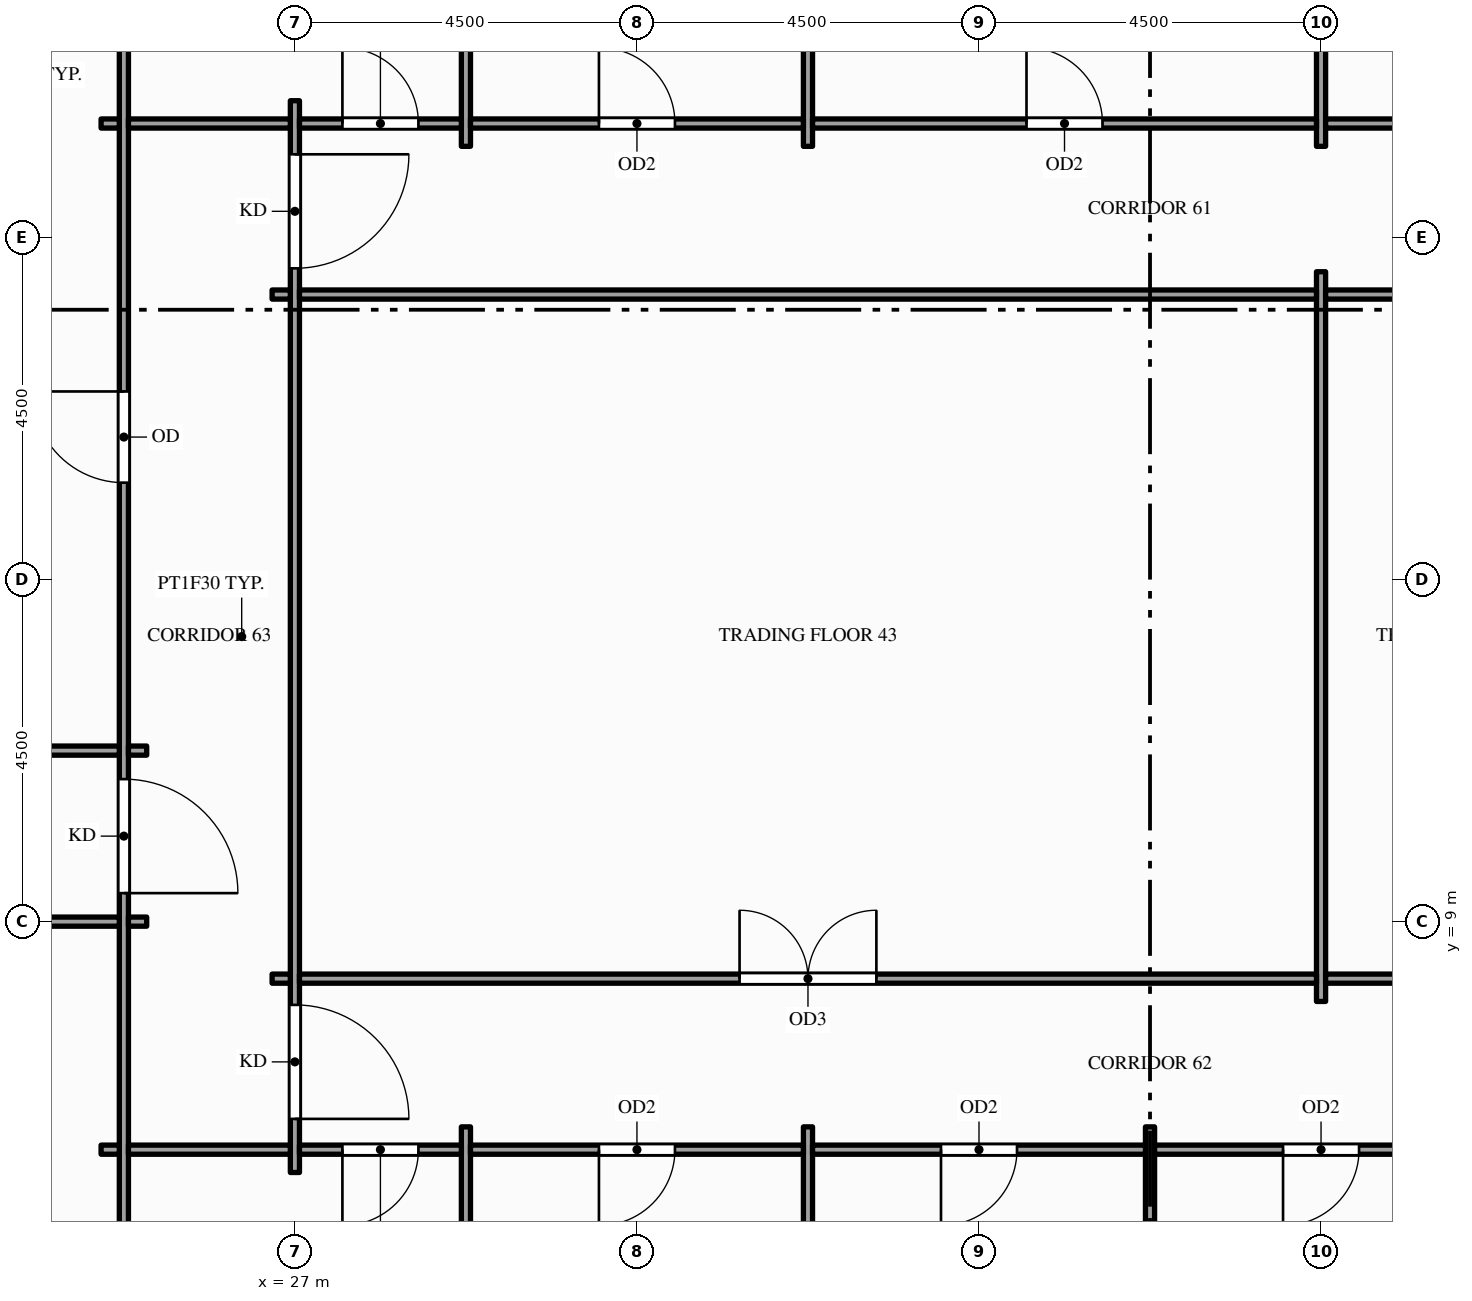
"""IFC4 building model, lengths in metres.
Left out: names, types, materials, properties, quantities, classifications, styles, units other than length and angle.
Written with IfcOpenShell. Run it as: python <this file> out.ifc"""

import sys

from ifc_helpers import new_model, si_unit, direction, frame, frame_2d, origin, place, context, subcontext, project, spatial, rectangle, extrude, element, fill, save


model = new_model("IFC4")
c1 = context("Model", 3, precision=1e-05, world=origin(), true_north=direction((0.0, 1.0)))
c2 = subcontext(c1, "Body", "Model", "MODEL_VIEW")
j1 = project(units=[si_unit("LENGTHUNIT", "METRE"), si_unit("PLANEANGLEUNIT", "RADIAN")], contexts=[c1])
p1 = place(None, origin())
s1 = spatial("IfcSite", under=j1, at=p1, CompositionType="ELEMENT")
p2 = place(p1, origin())
s2 = spatial("IfcBuilding", under=s1, at=p2, CompositionType="ELEMENT")
p3 = place(p2, frame((0.0, 0.0, 159.0)))
s3 = spatial("IfcBuildingStorey", under=s2, at=p3, CompositionType="ELEMENT", Elevation=159.0)
p4 = place(p3, frame((24.75, 1.65, 0.0), z_axis=(0.0, 0.0, 1.0), x_axis=(0.0, 1.0, 0.0)))
e1 = element("IfcWall", 1, at=p4, inside=s3, PredefinedType="PARTITIONING", context=c2, shape_type="SweptSolid", body=[
    extrude(rectangle(XDim=22.298, YDim=0.12, at=frame_2d((11.149, 0.0))), origin(), (0.0, 0.0, 1.0), 2.87),
])
p5 = place(p4, frame((7.725, 0.0, 0.0)))
e2 = element("IfcOpeningElement", 2, at=p5, cuts=e1, PredefinedType="OPENING", context=c2, shape_type="SweptSolid", body=[
    extrude(rectangle(XDim=1.5, YDim=2.1, at=frame_2d((0.75, 1.05))), frame((0.0, 0.07, 0.0), z_axis=(0.0, -1.0, 0.0), x_axis=(1.0, 0.0, 0.0)), (0.0, 0.0, 1.0), 0.14),
])
p6 = place(p4, frame((13.125, 0.0, 0.0)))
e3 = element("IfcOpeningElement", 3, at=p6, cuts=e1, PredefinedType="OPENING", context=c2, shape_type="SweptSolid", body=[
    extrude(rectangle(XDim=1.2, YDim=2.1, at=frame_2d((0.6, 1.05))), frame((0.0, 0.07, 0.0), z_axis=(0.0, -1.0, 0.0), x_axis=(1.0, 0.0, 0.0)), (0.0, 0.0, 1.0), 0.14),
])
p7 = place(p3, frame((27.0, 5.7, 0.0), z_axis=(0.0, 0.0, 1.0), x_axis=(0.0, 1.0, 0.0)))
e4 = element("IfcWall", 4, at=p7, inside=s3, PredefinedType="PARTITIONING", context=c2, shape_type="SweptSolid", body=[
    extrude(rectangle(XDim=14.1, YDim=0.12, at=frame_2d((7.05, 0.0))), origin(), (0.0, 0.0, 1.0), 2.87),
])
p8 = place(p7, frame((0.705, 0.0, 0.0)))
e5 = element("IfcOpeningElement", 5, at=p8, cuts=e4, PredefinedType="OPENING", context=c2, shape_type="SweptSolid", body=[
    extrude(rectangle(XDim=1.5, YDim=2.1, at=frame_2d((0.75, 1.05))), frame((0.0, 0.07, 0.0), z_axis=(0.0, -1.0, 0.0), x_axis=(1.0, 0.0, 0.0)), (0.0, 0.0, 1.0), 0.14),
])
p9 = place(p7, frame((11.895, 0.0, 0.0)))
e6 = element("IfcOpeningElement", 6, at=p9, cuts=e4, PredefinedType="OPENING", context=c2, shape_type="SweptSolid", body=[
    extrude(rectangle(XDim=1.5, YDim=2.1, at=frame_2d((0.75, 1.05))), frame((0.0, 0.07, 0.0), z_axis=(0.0, -1.0, 0.0), x_axis=(1.0, 0.0, 0.0)), (0.0, 0.0, 1.0), 0.14),
])
for number, where, z_axis, x_axis in (
    (7, (29.25, 1.65, 0.0), (0.0, 0.0, 1.0), (0.0, 1.0, 0.0)),
    (8, (29.25, 19.2, 0.0), (0.0, 0.0, 1.0), (0.0, 1.0, 0.0)),
    (9, (33.75, 1.65, 0.0), (0.0, 0.0, 1.0), (0.0, 1.0, 0.0)),
    (10, (33.75, 19.2, 0.0), (0.0, 0.0, 1.0), (0.0, 1.0, 0.0)),
    (11, (38.25, 1.65, 0.0), (0.0, 0.0, 1.0), (0.0, 1.0, 0.0)),
):
    element("IfcWall", number, at=place(p3, frame(where, z_axis=z_axis, x_axis=x_axis)), inside=s3, PredefinedType="PARTITIONING", context=c2, shape_type="SweptSolid", body=[
        extrude(rectangle(XDim=4.65, YDim=0.12, at=frame_2d((2.325, 0.0))), origin(), (0.0, 0.0, 1.0), 2.87),
    ])
p10 = place(p3, frame((40.5, 7.95, 0.0), z_axis=(0.0, 0.0, 1.0), x_axis=(0.0, 1.0, 0.0)))
e12 = element("IfcWall", 12, at=p10, inside=s3, PredefinedType="PARTITIONING", context=c2, shape_type="SweptSolid", body=[
    extrude(rectangle(XDim=9.6, YDim=0.12, at=frame_2d((4.8, 0.0))), origin(), (0.0, 0.0, 1.0), 2.87),
])
p11 = place(p3, frame((40.5, 19.2, 0.0), z_axis=(0.0, 0.0, 1.0), x_axis=(0.0, 1.0, 0.0)))
e13 = element("IfcWall", 13, at=p11, inside=s3, PredefinedType="PARTITIONING", context=c2, shape_type="SweptSolid", body=[
    extrude(rectangle(XDim=4.65, YDim=0.12, at=frame_2d((2.325, 0.0))), origin(), (0.0, 0.0, 1.0), 2.87),
])
p12 = place(p3, frame((24.45, 6.0, 0.0), z_axis=(0.0, 0.0, 1.0), x_axis=(1.0, 0.0, 0.0)))
e14 = element("IfcWall", 14, at=p12, inside=s3, PredefinedType="PARTITIONING", context=c2, shape_type="SweptSolid", body=[
    extrude(rectangle(XDim=0.24, YDim=0.12, at=frame_2d((0.12, 0.0))), origin(), (0.0, 0.0, 1.0), 2.87),
])
p13 = place(p3, frame((24.81, 6.0, 0.0), z_axis=(0.0, 0.0, 1.0), x_axis=(1.0, 0.0, 0.0)))
e15 = element("IfcWall", 15, at=p13, inside=s3, PredefinedType="PARTITIONING", context=c2, shape_type="SweptSolid", body=[
    extrude(rectangle(XDim=2.13, YDim=0.12, at=frame_2d((1.065, 0.0))), origin(), (0.0, 0.0, 1.0), 2.87),
])
p14 = place(p3, frame((27.06, 6.0, 0.0), z_axis=(0.0, 0.0, 1.0), x_axis=(1.0, 0.0, 0.0)))
e16 = element("IfcWall", 16, at=p14, inside=s3, PredefinedType="PARTITIONING", context=c2, shape_type="SweptSolid", body=[
    extrude(rectangle(XDim=2.13, YDim=0.12, at=frame_2d((1.065, 0.0))), origin(), (0.0, 0.0, 1.0), 2.87),
])
p15 = place(p14, frame((0.565, 0.0, 0.0)))
e17 = element("IfcOpeningElement", 17, at=p15, cuts=e16, PredefinedType="OPENING", context=c2, shape_type="SweptSolid", body=[
    extrude(rectangle(XDim=1.0, YDim=2.1, at=frame_2d((0.5, 1.05))), frame((0.0, 0.07, 0.0), z_axis=(0.0, -1.0, 0.0), x_axis=(1.0, 0.0, 0.0)), (0.0, 0.0, 1.0), 0.14),
])
p16 = place(p3, frame((29.31, 6.0, 0.0), z_axis=(0.0, 0.0, 1.0), x_axis=(1.0, 0.0, 0.0)))
e18 = element("IfcWall", 18, at=p16, inside=s3, PredefinedType="PARTITIONING", context=c2, shape_type="SweptSolid", body=[
    extrude(rectangle(XDim=4.38, YDim=0.12, at=frame_2d((2.19, 0.0))), origin(), (0.0, 0.0, 1.0), 2.87),
])
p17 = place(p16, frame((1.69, 0.0, 0.0)))
e19 = element("IfcOpeningElement", 19, at=p17, cuts=e18, PredefinedType="OPENING", context=c2, shape_type="SweptSolid", body=[
    extrude(rectangle(XDim=1.0, YDim=2.1, at=frame_2d((0.5, 1.05))), frame((0.0, 0.07, 0.0), z_axis=(0.0, -1.0, 0.0), x_axis=(1.0, 0.0, 0.0)), (0.0, 0.0, 1.0), 0.14),
])
p18 = place(p3, frame((33.81, 6.0, 0.0), z_axis=(0.0, 0.0, 1.0), x_axis=(1.0, 0.0, 0.0)))
e20 = element("IfcWall", 20, at=p18, inside=s3, PredefinedType="PARTITIONING", context=c2, shape_type="SweptSolid", body=[
    extrude(rectangle(XDim=4.38, YDim=0.12, at=frame_2d((2.19, 0.0))), origin(), (0.0, 0.0, 1.0), 2.87),
])
p19 = place(p18, frame((1.69, 0.0, 0.0)))
e21 = element("IfcOpeningElement", 21, at=p19, cuts=e20, PredefinedType="OPENING", context=c2, shape_type="SweptSolid", body=[
    extrude(rectangle(XDim=1.0, YDim=2.1, at=frame_2d((0.5, 1.05))), frame((0.0, 0.07, 0.0), z_axis=(0.0, -1.0, 0.0), x_axis=(1.0, 0.0, 0.0)), (0.0, 0.0, 1.0), 0.14),
])
p20 = place(p3, frame((38.31, 6.0, 0.0), z_axis=(0.0, 0.0, 1.0), x_axis=(1.0, 0.0, 0.0)))
e22 = element("IfcWall", 22, at=p20, inside=s3, PredefinedType="PARTITIONING", context=c2, shape_type="SweptSolid", body=[
    extrude(rectangle(XDim=4.38, YDim=0.12, at=frame_2d((2.19, 0.0))), origin(), (0.0, 0.0, 1.0), 2.87),
])
p21 = place(p20, frame((1.69, 0.0, 0.0)))
e23 = element("IfcOpeningElement", 23, at=p21, cuts=e22, PredefinedType="OPENING", context=c2, shape_type="SweptSolid", body=[
    extrude(rectangle(XDim=1.0, YDim=2.1, at=frame_2d((0.5, 1.05))), frame((0.0, 0.07, 0.0), z_axis=(0.0, -1.0, 0.0), x_axis=(1.0, 0.0, 0.0)), (0.0, 0.0, 1.0), 0.14),
])
p22 = place(p3, frame((26.7, 8.25, 0.0), z_axis=(0.0, 0.0, 1.0), x_axis=(1.0, 0.0, 0.0)))
e24 = element("IfcWall", 24, at=p22, inside=s3, PredefinedType="PARTITIONING", context=c2, shape_type="SweptSolid", body=[
    extrude(rectangle(XDim=0.24, YDim=0.12, at=frame_2d((0.12, 0.0))), origin(), (0.0, 0.0, 1.0), 2.87),
])
p23 = place(p3, frame((27.06, 8.25, 0.0), z_axis=(0.0, 0.0, 1.0), x_axis=(1.0, 0.0, 0.0)))
e25 = element("IfcWall", 25, at=p23, inside=s3, PredefinedType="PARTITIONING", context=c2, shape_type="SweptSolid", body=[
    extrude(rectangle(XDim=13.38, YDim=0.12, at=frame_2d((6.69, 0.0))), origin(), (0.0, 0.0, 1.0), 2.87),
])
p24 = place(p23, frame((5.79, 0.0, 0.0)))
e26 = element("IfcOpeningElement", 26, at=p24, cuts=e25, PredefinedType="OPENING", context=c2, shape_type="SweptSolid", body=[
    extrude(rectangle(XDim=1.8, YDim=2.1, at=frame_2d((0.9, 1.05))), frame((0.0, 0.07, 0.0), z_axis=(0.0, -1.0, 0.0), x_axis=(1.0, 0.0, 0.0)), (0.0, 0.0, 1.0), 0.14),
])
p25 = place(p3, frame((40.56, 8.25, 0.0), z_axis=(0.0, 0.0, 1.0), x_axis=(1.0, 0.0, 0.0)))
e27 = element("IfcWall", 27, at=p25, inside=s3, PredefinedType="PARTITIONING", context=c2, shape_type="SweptSolid", body=[
    extrude(rectangle(XDim=4.38, YDim=0.12, at=frame_2d((2.19, 0.0))), origin(), (0.0, 0.0, 1.0), 2.87),
])
p26 = place(p3, frame((18.06, 9.0, 0.0), z_axis=(0.0, 0.0, 1.0), x_axis=(1.0, 0.0, 0.0)))
e28 = element("IfcWall", 28, at=p26, inside=s3, PredefinedType="PARTITIONING", context=c2, shape_type="SweptSolid", body=[
    extrude(rectangle(XDim=6.63, YDim=0.12, at=frame_2d((3.315, 0.0))), origin(), (0.0, 0.0, 1.0), 2.87),
])
p27 = place(p26, frame((2.715, 0.0, 0.0)))
e29 = element("IfcOpeningElement", 29, at=p27, cuts=e28, PredefinedType="OPENING", context=c2, shape_type="SweptSolid", body=[
    extrude(rectangle(XDim=1.2, YDim=2.1, at=frame_2d((0.6, 1.05))), frame((0.0, 0.07, 0.0), z_axis=(0.0, -1.0, 0.0), x_axis=(1.0, 0.0, 0.0)), (0.0, 0.0, 1.0), 0.14),
])
p28 = place(p3, frame((24.81, 9.0, 0.0), z_axis=(0.0, 0.0, 1.0), x_axis=(1.0, 0.0, 0.0)))
e30 = element("IfcWall", 30, at=p28, inside=s3, PredefinedType="PARTITIONING", context=c2, shape_type="SweptSolid", body=[
    extrude(rectangle(XDim=0.24, YDim=0.12, at=frame_2d((0.12, 0.0))), origin(), (0.0, 0.0, 1.0), 2.87),
])
p29 = place(p3, frame((11.31, 11.25, 0.0), z_axis=(0.0, 0.0, 1.0), x_axis=(1.0, 0.0, 0.0)))
e31 = element("IfcWall", 31, at=p29, inside=s3, PredefinedType="PARTITIONING", context=c2, shape_type="SweptSolid", body=[
    extrude(rectangle(XDim=13.38, YDim=0.12, at=frame_2d((6.69, 0.0))), origin(), (0.0, 0.0, 1.0), 2.87),
])
p30 = place(p29, frame((3.54, 0.0, 0.0)))
e32 = element("IfcOpeningElement", 32, at=p30, cuts=e31, PredefinedType="OPENING", context=c2, shape_type="SweptSolid", body=[
    extrude(rectangle(XDim=1.8, YDim=2.1, at=frame_2d((0.9, 1.05))), frame((0.0, 0.07, 0.0), z_axis=(0.0, -1.0, 0.0), x_axis=(1.0, 0.0, 0.0)), (0.0, 0.0, 1.0), 0.14),
])
for number, where, z_axis, x_axis in (
    (33, (24.81, 11.25, 0.0), (0.0, 0.0, 1.0), (1.0, 0.0, 0.0)),
    (34, (26.7, 17.25, 0.0), (0.0, 0.0, 1.0), (1.0, 0.0, 0.0)),
):
    element("IfcWall", number, at=place(p3, frame(where, z_axis=z_axis, x_axis=x_axis)), inside=s3, PredefinedType="PARTITIONING", context=c2, shape_type="SweptSolid", body=[
        extrude(rectangle(XDim=0.24, YDim=0.12, at=frame_2d((0.12, 0.0))), origin(), (0.0, 0.0, 1.0), 2.87),
    ])
p31 = place(p3, frame((27.06, 17.25, 0.0), z_axis=(0.0, 0.0, 1.0), x_axis=(1.0, 0.0, 0.0)))
e35 = element("IfcWall", 35, at=p31, inside=s3, PredefinedType="PARTITIONING", context=c2, shape_type="SweptSolid", body=[
    extrude(rectangle(XDim=13.38, YDim=0.12, at=frame_2d((6.69, 0.0))), origin(), (0.0, 0.0, 1.0), 2.87),
])
p32 = place(p3, frame((40.56, 17.25, 0.0), z_axis=(0.0, 0.0, 1.0), x_axis=(1.0, 0.0, 0.0)))
e36 = element("IfcWall", 36, at=p32, inside=s3, PredefinedType="PARTITIONING", context=c2, shape_type="SweptSolid", body=[
    extrude(rectangle(XDim=4.38, YDim=0.12, at=frame_2d((2.19, 0.0))), origin(), (0.0, 0.0, 1.0), 2.87),
])
p33 = place(p32, frame((1.69, 0.0, 0.0)))
e37 = element("IfcOpeningElement", 37, at=p33, cuts=e36, PredefinedType="OPENING", context=c2, shape_type="SweptSolid", body=[
    extrude(rectangle(XDim=1.0, YDim=2.1, at=frame_2d((0.5, 1.05))), frame((0.0, 0.07, 0.0), z_axis=(0.0, -1.0, 0.0), x_axis=(1.0, 0.0, 0.0)), (0.0, 0.0, 1.0), 0.14),
])
p34 = place(p3, frame((24.45, 19.5, 0.0), z_axis=(0.0, 0.0, 1.0), x_axis=(1.0, 0.0, 0.0)))
e38 = element("IfcWall", 38, at=p34, inside=s3, PredefinedType="PARTITIONING", context=c2, shape_type="SweptSolid", body=[
    extrude(rectangle(XDim=0.24, YDim=0.12, at=frame_2d((0.12, 0.0))), origin(), (0.0, 0.0, 1.0), 2.87),
])
p35 = place(p3, frame((24.81, 19.5, 0.0), z_axis=(0.0, 0.0, 1.0), x_axis=(1.0, 0.0, 0.0)))
e39 = element("IfcWall", 39, at=p35, inside=s3, PredefinedType="PARTITIONING", context=c2, shape_type="SweptSolid", body=[
    extrude(rectangle(XDim=2.13, YDim=0.12, at=frame_2d((1.065, 0.0))), origin(), (0.0, 0.0, 1.0), 2.87),
])
p36 = place(p3, frame((27.06, 19.5, 0.0), z_axis=(0.0, 0.0, 1.0), x_axis=(1.0, 0.0, 0.0)))
e40 = element("IfcWall", 40, at=p36, inside=s3, PredefinedType="PARTITIONING", context=c2, shape_type="SweptSolid", body=[
    extrude(rectangle(XDim=2.13, YDim=0.12, at=frame_2d((1.065, 0.0))), origin(), (0.0, 0.0, 1.0), 2.87),
])
p37 = place(p36, frame((0.565, 0.0, 0.0)))
e41 = element("IfcOpeningElement", 41, at=p37, cuts=e40, PredefinedType="OPENING", context=c2, shape_type="SweptSolid", body=[
    extrude(rectangle(XDim=1.0, YDim=2.1, at=frame_2d((0.5, 1.05))), frame((0.0, 0.07, 0.0), z_axis=(0.0, -1.0, 0.0), x_axis=(1.0, 0.0, 0.0)), (0.0, 0.0, 1.0), 0.14),
])
p38 = place(p3, frame((29.31, 19.5, 0.0), z_axis=(0.0, 0.0, 1.0), x_axis=(1.0, 0.0, 0.0)))
e42 = element("IfcWall", 42, at=p38, inside=s3, PredefinedType="PARTITIONING", context=c2, shape_type="SweptSolid", body=[
    extrude(rectangle(XDim=4.38, YDim=0.12, at=frame_2d((2.19, 0.0))), origin(), (0.0, 0.0, 1.0), 2.87),
])
p39 = place(p38, frame((1.69, 0.0, 0.0)))
e43 = element("IfcOpeningElement", 43, at=p39, cuts=e42, PredefinedType="OPENING", context=c2, shape_type="SweptSolid", body=[
    extrude(rectangle(XDim=1.0, YDim=2.1, at=frame_2d((0.5, 1.05))), frame((0.0, 0.07, 0.0), z_axis=(0.0, -1.0, 0.0), x_axis=(1.0, 0.0, 0.0)), (0.0, 0.0, 1.0), 0.14),
])
p40 = place(p3, frame((33.81, 19.5, 0.0), z_axis=(0.0, 0.0, 1.0), x_axis=(1.0, 0.0, 0.0)))
e44 = element("IfcWall", 44, at=p40, inside=s3, PredefinedType="PARTITIONING", context=c2, shape_type="SweptSolid", body=[
    extrude(rectangle(XDim=6.63, YDim=0.12, at=frame_2d((3.315, 0.0))), origin(), (0.0, 0.0, 1.0), 2.87),
])
p41 = place(p40, frame((2.815, 0.0, 0.0)))
e45 = element("IfcOpeningElement", 45, at=p41, cuts=e44, PredefinedType="OPENING", context=c2, shape_type="SweptSolid", body=[
    extrude(rectangle(XDim=1.0, YDim=2.1, at=frame_2d((0.5, 1.05))), frame((0.0, 0.07, 0.0), z_axis=(0.0, -1.0, 0.0), x_axis=(1.0, 0.0, 0.0)), (0.0, 0.0, 1.0), 0.14),
])
p42 = place(p3, frame((40.56, 19.5, 0.0), z_axis=(0.0, 0.0, 1.0), x_axis=(1.0, 0.0, 0.0)))
e46 = element("IfcWall", 46, at=p42, inside=s3, PredefinedType="PARTITIONING", context=c2, shape_type="SweptSolid", body=[
    extrude(rectangle(XDim=4.38, YDim=0.12, at=frame_2d((2.19, 0.0))), origin(), (0.0, 0.0, 1.0), 2.87),
])
p43 = place(p42, frame((1.69, 0.0, 0.0)))
e47 = element("IfcOpeningElement", 47, at=p43, cuts=e46, PredefinedType="OPENING", context=c2, shape_type="SweptSolid", body=[
    extrude(rectangle(XDim=1.0, YDim=2.1, at=frame_2d((0.5, 1.05))), frame((0.0, 0.07, 0.0), z_axis=(0.0, -1.0, 0.0), x_axis=(1.0, 0.0, 0.0)), (0.0, 0.0, 1.0), 0.14),
])
p44 = place(p5, origin())
e48 = element("IfcDoor", 48, at=p44, inside=s3, OperationType="SINGLE_SWING_LEFT", PredefinedType="DOOR", context=c2, shape_type="SweptSolid", body=[
    extrude(rectangle(XDim=1.5, YDim=2.1, at=frame_2d((0.75, 1.05))), frame((0.0, 0.025, 0.0), z_axis=(0.0, -1.0, 0.0), x_axis=(1.0, 0.0, 0.0)), (0.0, 0.0, 1.0), 0.05),
])
fill(e2, e48)
p45 = place(p8, origin())
e49 = element("IfcDoor", 49, at=p45, inside=s3, OperationType="SINGLE_SWING_LEFT", PredefinedType="DOOR", context=c2, shape_type="SweptSolid", body=[
    extrude(rectangle(XDim=1.5, YDim=2.1, at=frame_2d((0.75, 1.05))), frame((0.0, 0.025, 0.0), z_axis=(0.0, -1.0, 0.0), x_axis=(1.0, 0.0, 0.0)), (0.0, 0.0, 1.0), 0.05),
])
fill(e5, e49)
p46 = place(p9, origin())
e50 = element("IfcDoor", 50, at=p46, inside=s3, OperationType="SINGLE_SWING_RIGHT", PredefinedType="DOOR", context=c2, shape_type="SweptSolid", body=[
    extrude(rectangle(XDim=1.5, YDim=2.1, at=frame_2d((0.75, 1.05))), frame((0.0, 0.025, 0.0), z_axis=(0.0, -1.0, 0.0), x_axis=(1.0, 0.0, 0.0)), (0.0, 0.0, 1.0), 0.05),
])
fill(e6, e50)
p47 = place(p24, origin())
e51 = element("IfcDoor", 51, at=p47, inside=s3, OperationType="DOUBLE_DOOR_SINGLE_SWING", PredefinedType="DOOR", context=c2, shape_type="SweptSolid", body=[
    extrude(rectangle(XDim=1.8, YDim=2.1, at=frame_2d((0.9, 1.05))), frame((0.0, 0.025, 0.0), z_axis=(0.0, -1.0, 0.0), x_axis=(1.0, 0.0, 0.0)), (0.0, 0.0, 1.0), 0.05),
])
fill(e26, e51)
p48 = place(p15, origin())
e52 = element("IfcDoor", 52, at=p48, inside=s3, OperationType="SINGLE_SWING_LEFT", PredefinedType="DOOR", context=c2, shape_type="SweptSolid", body=[
    extrude(rectangle(XDim=1.0, YDim=2.1, at=frame_2d((0.5, 1.05))), frame((0.0, 0.025, 0.0), z_axis=(0.0, -1.0, 0.0), x_axis=(1.0, 0.0, 0.0)), (0.0, 0.0, 1.0), 0.05),
])
fill(e17, e52)
p49 = place(p17, origin())
e53 = element("IfcDoor", 53, at=p49, inside=s3, OperationType="SINGLE_SWING_LEFT", PredefinedType="DOOR", context=c2, shape_type="SweptSolid", body=[
    extrude(rectangle(XDim=1.0, YDim=2.1, at=frame_2d((0.5, 1.05))), frame((0.0, 0.025, 0.0), z_axis=(0.0, -1.0, 0.0), x_axis=(1.0, 0.0, 0.0)), (0.0, 0.0, 1.0), 0.05),
])
fill(e19, e53)
p50 = place(p19, origin())
e54 = element("IfcDoor", 54, at=p50, inside=s3, OperationType="SINGLE_SWING_LEFT", PredefinedType="DOOR", context=c2, shape_type="SweptSolid", body=[
    extrude(rectangle(XDim=1.0, YDim=2.1, at=frame_2d((0.5, 1.05))), frame((0.0, 0.025, 0.0), z_axis=(0.0, -1.0, 0.0), x_axis=(1.0, 0.0, 0.0)), (0.0, 0.0, 1.0), 0.05),
])
fill(e21, e54)
p51 = place(p21, origin())
e55 = element("IfcDoor", 55, at=p51, inside=s3, OperationType="SINGLE_SWING_LEFT", PredefinedType="DOOR", context=c2, shape_type="SweptSolid", body=[
    extrude(rectangle(XDim=1.0, YDim=2.1, at=frame_2d((0.5, 1.05))), frame((0.0, 0.025, 0.0), z_axis=(0.0, -1.0, 0.0), x_axis=(1.0, 0.0, 0.0)), (0.0, 0.0, 1.0), 0.05),
])
fill(e23, e55)
p52 = place(p37, origin())
e56 = element("IfcDoor", 56, at=p52, inside=s3, OperationType="SINGLE_SWING_LEFT", PredefinedType="DOOR", context=c2, shape_type="SweptSolid", body=[
    extrude(rectangle(XDim=1.0, YDim=2.1, at=frame_2d((0.5, 1.05))), frame((0.0, 0.025, 0.0), z_axis=(0.0, -1.0, 0.0), x_axis=(1.0, 0.0, 0.0)), (0.0, 0.0, 1.0), 0.05),
])
fill(e41, e56)
p53 = place(p39, origin())
e57 = element("IfcDoor", 57, at=p53, inside=s3, OperationType="SINGLE_SWING_LEFT", PredefinedType="DOOR", context=c2, shape_type="SweptSolid", body=[
    extrude(rectangle(XDim=1.0, YDim=2.1, at=frame_2d((0.5, 1.05))), frame((0.0, 0.025, 0.0), z_axis=(0.0, -1.0, 0.0), x_axis=(1.0, 0.0, 0.0)), (0.0, 0.0, 1.0), 0.05),
])
fill(e43, e57)
p54 = place(p41, origin())
e58 = element("IfcDoor", 58, at=p54, inside=s3, OperationType="SINGLE_SWING_LEFT", PredefinedType="DOOR", context=c2, shape_type="SweptSolid", body=[
    extrude(rectangle(XDim=1.0, YDim=2.1, at=frame_2d((0.5, 1.05))), frame((0.0, 0.025, 0.0), z_axis=(0.0, -1.0, 0.0), x_axis=(1.0, 0.0, 0.0)), (0.0, 0.0, 1.0), 0.05),
])
fill(e45, e58)
p55 = place(p6, origin())
e59 = element("IfcDoor", 59, at=p55, inside=s3, OperationType="SINGLE_SWING_RIGHT", PredefinedType="DOOR", context=c2, shape_type="SweptSolid", body=[
    extrude(rectangle(XDim=1.2, YDim=2.1, at=frame_2d((0.6, 1.05))), frame((0.0, 0.025, 0.0), z_axis=(0.0, -1.0, 0.0), x_axis=(1.0, 0.0, 0.0)), (0.0, 0.0, 1.0), 0.05),
])
fill(e3, e59)
save(model, sys.argv[1])
